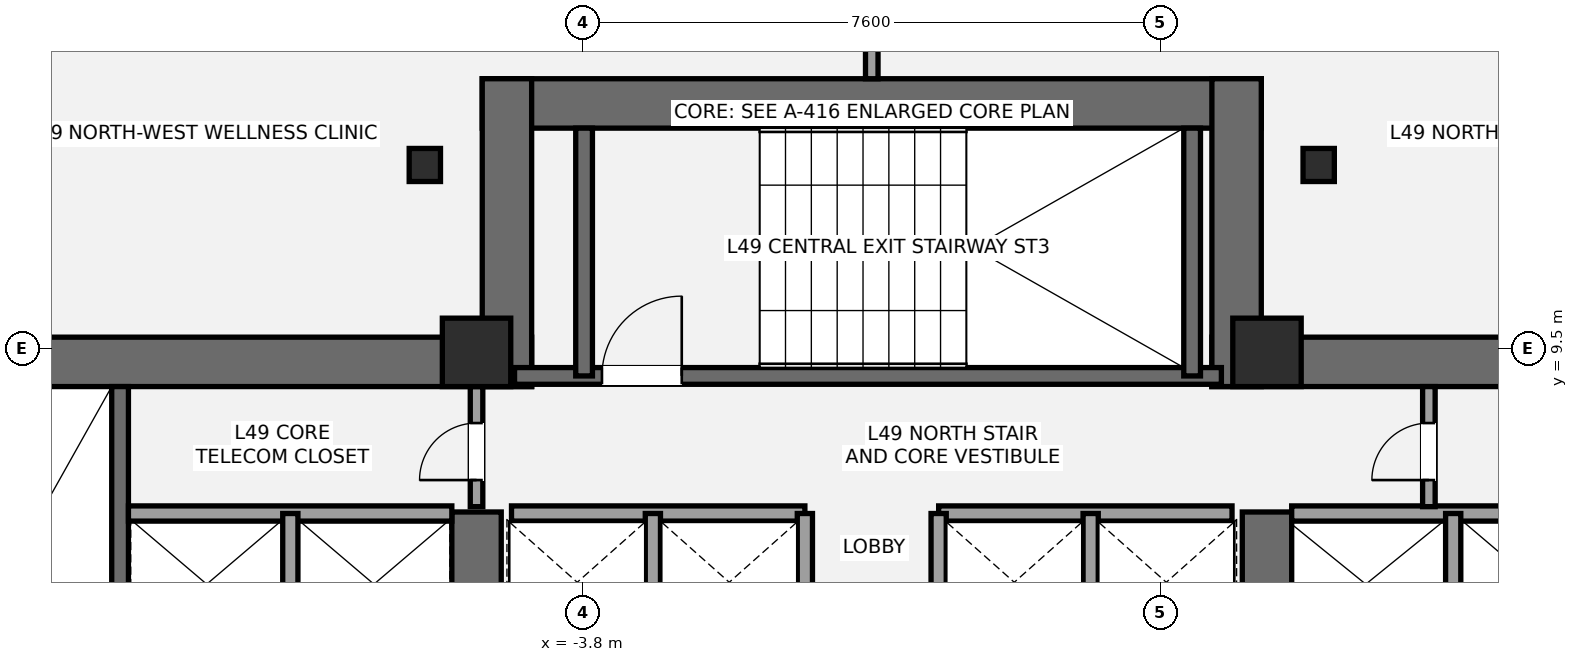
"""IFC4 building model, lengths in metres.
Left out: names, types, materials, properties, quantities, classifications, styles, units other than length and angle.
Written with IfcOpenShell. Run it as: python <this file> out.ifc"""

import sys

from ifc_helpers import new_model, si_unit, direction, frame, frame_2d, origin, origin_2d, place, context, subcontext, project, spatial, rectangle, i_section, extrude, element, fill, save


model = new_model("IFC4")
c1 = context("Model", 3, precision=1e-05, world=origin(), true_north=direction((0.0, 1.0)))
c2 = subcontext(c1, "Body", "Model", "MODEL_VIEW")
j1 = project(units=[si_unit("LENGTHUNIT", "METRE"), si_unit("PLANEANGLEUNIT", "RADIAN")], contexts=[c1])
p1 = place(None, origin())
s1 = spatial("IfcSite", under=j1, at=p1, CompositionType="ELEMENT")
p2 = place(p1, origin())
s2 = spatial("IfcBuilding", under=s1, at=p2, CompositionType="ELEMENT")
p3 = place(p2, frame((0.0, 0.0, 179.0)))
s3 = spatial("IfcBuildingStorey", under=s2, at=p3, CompositionType="ELEMENT", Elevation=179.0)
p4 = place(p3, frame((-13.8, 9.325, 0.0), z_axis=(0.0, 0.0, 1.0), x_axis=(1.0, 0.0, 0.0)))
e1 = element("IfcWall", 1, at=p4, inside=s3, PredefinedType="SHEAR", context=c2, shape_type="SweptSolid", body=[
    extrude(rectangle(XDim=9.325, YDim=0.65, at=frame_2d((4.663, 0.0))), origin(), (0.0, 0.0, 1.0), 3.2),
])
p5 = place(p3, frame((-5.2, 5.35, 0.0), z_axis=(0.0, 0.0, 1.0), x_axis=(0.0, 1.0, 0.0)))
e2 = element("IfcWall", 2, at=p5, inside=s3, PredefinedType="SHEAR", context=c2, shape_type="SweptSolid", body=[
    extrude(rectangle(XDim=2.0, YDim=0.65, at=frame_2d((1.0, 0.0))), origin(), (0.0, 0.0, 1.0), 3.2),
])
p6 = place(p3, frame((-9.89, 1.85, 0.0), z_axis=(0.0, 0.0, 1.0), x_axis=(0.0, 1.0, 0.0)))
e3 = element("IfcWall", 3, at=p6, inside=s3, PredefinedType="SHEAR", context=c2, shape_type="SweptSolid", body=[
    extrude(rectangle(XDim=7.15, YDim=0.22, at=frame_2d((3.575, 0.0))), origin(), (0.0, 0.0, 1.0), 3.2),
])
p7 = place(p3, frame((4.475, 9.325, 0.0), z_axis=(0.0, 0.0, 1.0), x_axis=(1.0, 0.0, 0.0)))
e4 = element("IfcWall", 4, at=p7, inside=s3, PredefinedType="SHEAR", context=c2, shape_type="SweptSolid", body=[
    extrude(rectangle(XDim=9.325, YDim=0.65, at=frame_2d((4.663, 0.0))), origin(), (0.0, 0.0, 1.0), 3.2),
])
p8 = place(p3, frame((5.2, 5.35, 0.0), z_axis=(0.0, 0.0, 1.0), x_axis=(0.0, 1.0, 0.0)))
e5 = element("IfcWall", 5, at=p8, inside=s3, PredefinedType="SHEAR", context=c2, shape_type="SweptSolid", body=[
    extrude(rectangle(XDim=2.0, YDim=0.65, at=frame_2d((1.0, 0.0))), origin(), (0.0, 0.0, 1.0), 3.2),
])
p9 = place(p3, frame((-5.125, 12.725, 0.0), z_axis=(0.0, 0.0, 1.0), x_axis=(1.0, 0.0, 0.0)))
e6 = element("IfcWall", 6, at=p9, inside=s3, PredefinedType="SHEAR", context=c2, shape_type="SweptSolid", body=[
    extrude(rectangle(XDim=10.25, YDim=0.65, at=frame_2d((5.125, 0.0))), origin(), (0.0, 0.0, 1.0), 3.2),
])
for number, where, z_axis, x_axis in (
    (7, (-4.8, 9.0, 0.0), (0.0, 0.0, 1.0), (0.0, 1.0, 0.0)),
    (8, (4.8, 9.0, 0.0), (0.0, 0.0, 1.0), (0.0, 1.0, 0.0)),
):
    element("IfcWall", number, at=place(p3, frame(where, z_axis=z_axis, x_axis=x_axis)), inside=s3, PredefinedType="SHEAR", context=c2, shape_type="SweptSolid", body=[
        extrude(rectangle(XDim=4.05, YDim=0.65, at=frame_2d((2.025, 0.0))), origin(), (0.0, 0.0, 1.0), 3.2),
    ])
p10 = place(p3, frame((-4.7, 9.14, 0.0), z_axis=(0.0, 0.0, 1.0), x_axis=(1.0, 0.0, 0.0)))
e9 = element("IfcWall", 9, at=p10, inside=s3, PredefinedType="SHEAR", context=c2, shape_type="SweptSolid", body=[
    extrude(rectangle(XDim=9.3, YDim=0.22, at=frame_2d((4.65, 0.0))), origin(), (0.0, 0.0, 1.0), 3.2),
])
p11 = place(p10, frame((1.15, 0.0, 0.0)))
e10 = element("IfcOpeningElement", 10, at=p11, cuts=e9, PredefinedType="OPENING", context=c2, shape_type="SweptSolid", body=[
    extrude(rectangle(XDim=1.05, YDim=2.15, at=frame_2d((0.525, 1.075))), frame((0.0, 0.12, 0.0), z_axis=(0.0, -1.0, 0.0), x_axis=(1.0, 0.0, 0.0)), (0.0, 0.0, 1.0), 0.24),
])
for number, where, z_axis, x_axis in (
    (11, (-3.785, 9.14, 0.0), (0.0, 0.0, 1.0), (0.0, 1.0, 0.0)),
    (12, (4.215, 9.14, 0.0), (0.0, 0.0, 1.0), (0.0, 1.0, 0.0)),
):
    element("IfcWall", number, at=place(p3, frame(where, z_axis=z_axis, x_axis=x_axis)), inside=s3, PredefinedType="SHEAR", context=c2, shape_type="SweptSolid", body=[
        extrude(rectangle(XDim=3.26, YDim=0.22, at=frame_2d((1.63, 0.0))), origin(), (0.0, 0.0, 1.0), 3.2),
    ])
for number, where, z_axis, x_axis in (
    (13, (-5.2, 9.45, 0.0), (0.0, 0.0, 1.0), (1.0, 0.0, 0.0)),
    (14, (5.2, 9.45, 0.0), (0.0, 0.0, 1.0), (1.0, 0.0, 0.0)),
):
    element("IfcColumn", number, at=place(p3, frame(where, z_axis=z_axis, x_axis=x_axis)), inside=s3, PredefinedType="COLUMN", context=c2, shape_type="SweptSolid", body=[
        extrude(rectangle(XDim=0.9, YDim=0.9, at=origin_2d()), origin(), (0.0, 0.0, 1.0), 3.2),
    ])
for number, where, z_axis, x_axis in (
    (15, (5.88, 11.915, 0.0), (0.0, 0.0, 1.0), (1.0, 0.0, 0.0)),
    (16, (-5.88, 11.915, 0.0), (0.0, 0.0, 1.0), (1.0, 0.0, 0.0)),
):
    element("IfcColumn", number, at=place(p3, frame(where, z_axis=z_axis, x_axis=x_axis)), inside=s3, PredefinedType="COLUMN", context=c2, shape_type="SweptSolid", body=[
        extrude(i_section(OverallWidth=0.412, OverallDepth=0.435, WebThickness=0.036, FlangeThickness=0.057, at=origin_2d()), origin(), (0.0, 0.0, 1.0), 3.2),
    ])
p12 = place(p3, frame((-9.78, 7.33, 0.0), z_axis=(0.0, 0.0, 1.0), x_axis=(1.0, 0.0, 0.0)))
e17 = element("IfcWall", 17, at=p12, inside=s3, PredefinedType="SOLIDWALL", context=c2, shape_type="SweptSolid", body=[
    extrude(rectangle(XDim=4.255, YDim=0.2, at=frame_2d((2.127, 0.0))), origin(), (0.0, 0.0, 1.0), 3.02),
])
p13 = place(p3, frame((-7.65, 5.47, 0.0), z_axis=(0.0, 0.0, 1.0), x_axis=(0.0, 1.0, 0.0)))
e18 = element("IfcWall", 18, at=p13, inside=s3, PredefinedType="SOLIDWALL", context=c2, shape_type="SweptSolid", body=[
    extrude(rectangle(XDim=1.86, YDim=0.2, at=frame_2d((0.93, 0.0))), origin(), (0.0, 0.0, 1.0), 3.02),
])
p14 = place(p3, frame((5.525, 7.33, 0.0), z_axis=(0.0, 0.0, 1.0), x_axis=(1.0, 0.0, 0.0)))
e19 = element("IfcWall", 19, at=p14, inside=s3, PredefinedType="SOLIDWALL", context=c2, shape_type="SweptSolid", body=[
    extrude(rectangle(XDim=4.255, YDim=0.2, at=frame_2d((2.127, 0.0))), origin(), (0.0, 0.0, 1.0), 3.02),
])
p15 = place(p3, frame((7.65, 5.47, 0.0), z_axis=(0.0, 0.0, 1.0), x_axis=(0.0, 1.0, 0.0)))
e20 = element("IfcWall", 20, at=p15, inside=s3, PredefinedType="SOLIDWALL", context=c2, shape_type="SweptSolid", body=[
    extrude(rectangle(XDim=1.86, YDim=0.2, at=frame_2d((0.93, 0.0))), origin(), (0.0, 0.0, 1.0), 3.02),
])
for number, where, z_axis, x_axis in (
    (21, (-4.74, 7.33, 0.0), (0.0, 0.0, 1.0), (1.0, 0.0, 0.0)),
    (22, (0.88, 7.33, 0.0), (0.0, 0.0, 1.0), (1.0, 0.0, 0.0)),
):
    element("IfcWall", number, at=place(p3, frame(where, z_axis=z_axis, x_axis=x_axis)), inside=s3, PredefinedType="SOLIDWALL", context=c2, shape_type="SweptSolid", body=[
        extrude(rectangle(XDim=3.86, YDim=0.2, at=frame_2d((1.93, 0.0))), origin(), (0.0, 0.0, 1.0), 3.02),
    ])
for number, where, z_axis, x_axis in (
    (23, (-2.88, 5.52, 0.0), (0.0, 0.0, 1.0), (0.0, 1.0, 0.0)),
    (24, (2.88, 5.52, 0.0), (0.0, 0.0, 1.0), (0.0, 1.0, 0.0)),
    (25, (-0.88, 5.52, 0.0), (0.0, 0.0, 1.0), (0.0, 1.0, 0.0)),
    (26, (0.88, 5.52, 0.0), (0.0, 0.0, 1.0), (0.0, 1.0, 0.0)),
):
    element("IfcWall", number, at=place(p3, frame(where, z_axis=z_axis, x_axis=x_axis)), inside=s3, PredefinedType="SOLIDWALL", context=c2, shape_type="SweptSolid", body=[
        extrude(rectangle(XDim=1.81, YDim=0.2, at=frame_2d((0.905, 0.0))), origin(), (0.0, 0.0, 1.0), 3.02),
    ])
p16 = place(p3, frame((-5.2, 7.42, 0.0), z_axis=(0.0, 0.0, 1.0), x_axis=(0.0, 1.0, 0.0)))
e27 = element("IfcWall", 27, at=p16, inside=s3, PredefinedType="PARTITIONING", context=c2, shape_type="SweptSolid", body=[
    extrude(rectangle(XDim=1.58, YDim=0.165, at=frame_2d((0.79, 0.0))), origin(), (0.0, 0.0, 1.0), 3.02),
])
p17 = place(p16, frame((0.35, 0.0, 0.0)))
e28 = element("IfcOpeningElement", 28, at=p17, cuts=e27, PredefinedType="OPENING", context=c2, shape_type="SweptSolid", body=[
    extrude(rectangle(XDim=0.75, YDim=2.1, at=frame_2d((0.375, 1.05))), frame((0.0, 0.093, 0.0), z_axis=(0.0, -1.0, 0.0), x_axis=(1.0, 0.0, 0.0)), (0.0, 0.0, 1.0), 0.185),
])
p18 = place(p3, frame((7.33, 7.42, 0.0), z_axis=(0.0, 0.0, 1.0), x_axis=(0.0, 1.0, 0.0)))
e29 = element("IfcWall", 29, at=p18, inside=s3, PredefinedType="PARTITIONING", context=c2, shape_type="SweptSolid", body=[
    extrude(rectangle(XDim=1.58, YDim=0.165, at=frame_2d((0.79, 0.0))), origin(), (0.0, 0.0, 1.0), 3.02),
])
p19 = place(p18, frame((0.35, 0.0, 0.0)))
e30 = element("IfcOpeningElement", 30, at=p19, cuts=e29, PredefinedType="OPENING", context=c2, shape_type="SweptSolid", body=[
    extrude(rectangle(XDim=0.75, YDim=2.1, at=frame_2d((0.375, 1.05))), frame((0.0, 0.093, 0.0), z_axis=(0.0, -1.0, 0.0), x_axis=(1.0, 0.0, 0.0)), (0.0, 0.0, 1.0), 0.185),
])
p20 = place(p3, frame((0.0, 13.05, 0.0), z_axis=(0.0, 0.0, 1.0), x_axis=(0.0, 1.0, 0.0)))
e31 = element("IfcWall", 31, at=p20, inside=s3, PredefinedType="PARTITIONING", context=c2, shape_type="SweptSolid", body=[
    extrude(rectangle(XDim=3.367, YDim=0.165, at=frame_2d((1.684, 0.0))), origin(), (0.0, 0.0, 1.0), 3.02),
])
p21 = place(p11, origin())
e32 = element("IfcDoor", 32, at=p21, inside=s3, OperationType="SINGLE_SWING_RIGHT", PredefinedType="DOOR", context=c2, shape_type="SweptSolid", body=[
    extrude(rectangle(XDim=1.05, YDim=2.15, at=frame_2d((0.525, 1.075))), frame((0.0, 0.025, 0.0), z_axis=(0.0, -1.0, 0.0), x_axis=(1.0, 0.0, 0.0)), (0.0, 0.0, 1.0), 0.05),
])
fill(e10, e32)
p22 = place(p17, origin())
e33 = element("IfcDoor", 33, at=p22, inside=s3, OperationType="SINGLE_SWING_LEFT", PredefinedType="DOOR", context=c2, shape_type="SweptSolid", body=[
    extrude(rectangle(XDim=0.75, YDim=2.1, at=frame_2d((0.375, 1.05))), frame((0.0, 0.025, 0.0), z_axis=(0.0, -1.0, 0.0), x_axis=(1.0, 0.0, 0.0)), (0.0, 0.0, 1.0), 0.05),
])
fill(e28, e33)
p23 = place(p19, origin())
e34 = element("IfcDoor", 34, at=p23, inside=s3, OperationType="SINGLE_SWING_LEFT", PredefinedType="DOOR", context=c2, shape_type="SweptSolid", body=[
    extrude(rectangle(XDim=0.75, YDim=2.1, at=frame_2d((0.375, 1.05))), frame((0.0, 0.025, 0.0), z_axis=(0.0, -1.0, 0.0), x_axis=(1.0, 0.0, 0.0)), (0.0, 0.0, 1.0), 0.05),
])
fill(e30, e34)
save(model, sys.argv[1])
